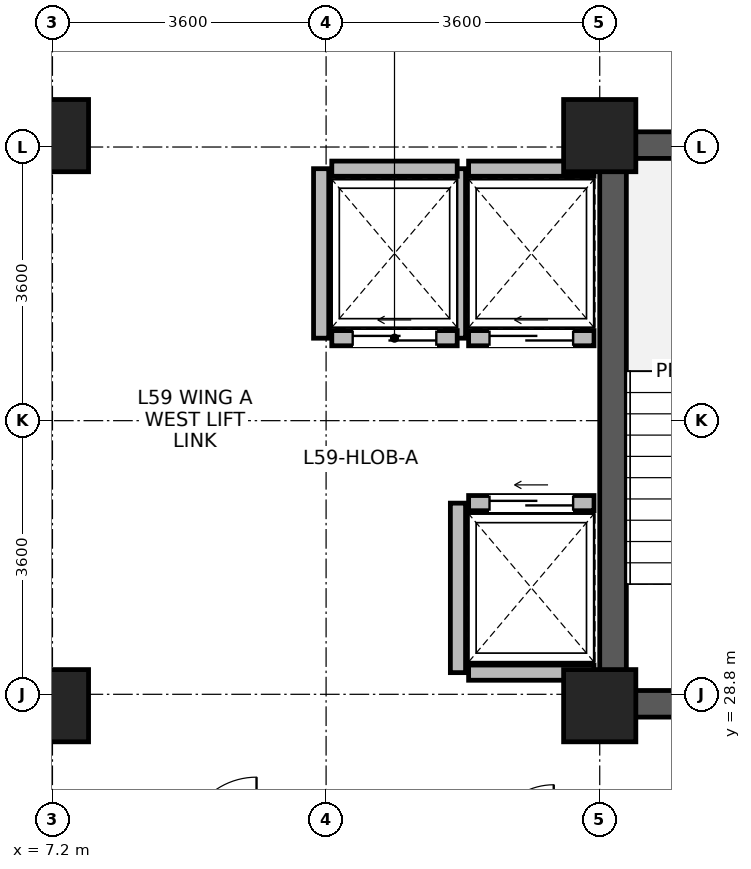
"""IFC4 building model, lengths in metres.
Left out: names, types, materials, properties, quantities, classifications, styles, units other than length and angle.
Written with IfcOpenShell. Run it as: python <this file> out.ifc"""

import sys

from ifc_helpers import new_model, si_unit, direction, frame, frame_2d, origin, origin_2d, place, context, subcontext, project, spatial, rectangle, extrude, source, transform, mapped, element, fill, save


model = new_model("IFC4")
c1 = context("Model", 3, precision=1e-05, world=origin(), true_north=direction((0.0, 1.0)))
c2 = subcontext(c1, "Body", "Model", "MODEL_VIEW")
j1 = project(units=[si_unit("LENGTHUNIT", "METRE"), si_unit("PLANEANGLEUNIT", "RADIAN")], contexts=[c1])
p1 = place(None, origin())
s1 = spatial("IfcSite", under=j1, at=p1, CompositionType="ELEMENT")
p2 = place(p1, origin())
s2 = spatial("IfcBuilding", under=s1, at=p2, CompositionType="ELEMENT")
p3 = place(p2, frame((0.0, 0.0, 231.4)))
s3 = spatial("IfcBuildingStorey", under=s2, at=p3, CompositionType="ELEMENT", Elevation=231.4)
p4 = place(p3, frame((14.575, 28.5, 0.0), z_axis=(0.0, 0.0, 1.0), x_axis=(0.0, 1.0, 0.0)))
e1 = element("IfcWall", 1, at=p4, inside=s3, PredefinedType="SHEAR", context=c2, shape_type="SweptSolid", body=[
    extrude(rectangle(XDim=7.7, YDim=0.35, at=frame_2d((3.85, 0.0))), origin(), (0.0, 0.0, 1.0), 3.44),
])
for number, where, z_axis, x_axis in (
    (2, (14.75, 28.675, 0.0), (0.0, 0.0, 1.0), (1.0, 0.0, 0.0)),
    (3, (14.75, 36.025, 0.0), (0.0, 0.0, 1.0), (1.0, 0.0, 0.0)),
):
    element("IfcWall", number, at=place(p3, frame(where, z_axis=z_axis, x_axis=x_axis)), inside=s3, PredefinedType="SHEAR", context=c2, shape_type="SweptSolid", body=[
        extrude(rectangle(XDim=3.2, YDim=0.35, at=frame_2d((1.6, 0.0))), origin(), (0.0, 0.0, 1.0), 3.44),
    ])
m1 = source(origin(), c2, "Body", "SweptSolid", [
    extrude(rectangle(XDim=0.95, YDim=0.95, at=origin_2d()), origin(), (0.0, 0.0, 1.0), 3.7),
])
for number, where, z_axis, x_axis in (
    (4, (7.2, 28.65, 0.0), (0.0, 0.0, 1.0), (1.0, 0.0, 0.0)),
    (5, (7.2, 36.15, 0.0), (0.0, 0.0, 1.0), (1.0, 0.0, 0.0)),
    (6, (14.4, 28.65, 0.0), (0.0, 0.0, 1.0), (1.0, 0.0, 0.0)),
    (7, (14.4, 36.15, 0.0), (0.0, 0.0, 1.0), (1.0, 0.0, 0.0)),
):
    element("IfcColumn", number, at=place(p3, frame(where, z_axis=z_axis, x_axis=x_axis)), inside=s3, PredefinedType="COLUMN", context=c2, shape_type="MappedRepresentation", body=[
        mapped(m1, transform((0.0, 0.0, 0.0), x_axis=(1.0, 0.0, 0.0), y_axis=(0.0, 1.0, 0.0), z_axis=(0.0, 0.0, 1.0), scale=1.0)),
    ])
p5 = place(p3, frame((12.675, 33.485, 0.0), z_axis=(0.0, 0.0, 1.0), x_axis=(1.0, 0.0, 0.0)))
e8 = element("IfcWall", 8, at=p5, inside=s3, PredefinedType="PARTITIONING", context=c2, shape_type="SweptSolid", body=[
    extrude(rectangle(XDim=1.65, YDim=0.2, at=frame_2d((0.825, 0.0))), origin(), (0.0, 0.0, 1.0), 3.42),
])
p6 = place(p5, frame((0.275, 0.0, 0.0)))
e9 = element("IfcOpeningElement", 9, at=p6, cuts=e8, PredefinedType="OPENING", context=c2, shape_type="SweptSolid", body=[
    extrude(rectangle(XDim=1.1, YDim=2.12, at=frame_2d((0.55, 1.06))), frame((0.0, 0.11, 0.0), z_axis=(0.0, -1.0, 0.0), x_axis=(1.0, 0.0, 0.0)), (0.0, 0.0, 1.0), 0.22),
])
p7 = place(p3, frame((12.675, 35.715, 0.0), z_axis=(0.0, 0.0, 1.0), x_axis=(1.0, 0.0, 0.0)))
e10 = element("IfcWall", 10, at=p7, inside=s3, PredefinedType="PARTITIONING", context=c2, shape_type="SweptSolid", body=[
    extrude(rectangle(XDim=1.65, YDim=0.2, at=frame_2d((0.825, 0.0))), origin(), (0.0, 0.0, 1.0), 3.42),
])
p8 = place(p3, frame((12.535, 33.485, 0.0), z_axis=(0.0, 0.0, 1.0), x_axis=(0.0, 1.0, 0.0)))
e11 = element("IfcWall", 11, at=p8, inside=s3, PredefinedType="PARTITIONING", context=c2, shape_type="SweptSolid", body=[
    extrude(rectangle(XDim=2.23, YDim=0.2, at=frame_2d((1.115, 0.0))), origin(), (0.0, 0.0, 1.0), 3.42),
])
p9 = place(p3, frame((12.675, 29.085, 0.0), z_axis=(0.0, 0.0, 1.0), x_axis=(1.0, 0.0, 0.0)))
e12 = element("IfcWall", 12, at=p9, inside=s3, PredefinedType="PARTITIONING", context=c2, shape_type="SweptSolid", body=[
    extrude(rectangle(XDim=1.65, YDim=0.2, at=frame_2d((0.825, 0.0))), origin(), (0.0, 0.0, 1.0), 3.42),
])
p10 = place(p3, frame((12.675, 31.315, 0.0), z_axis=(0.0, 0.0, 1.0), x_axis=(1.0, 0.0, 0.0)))
e13 = element("IfcWall", 13, at=p10, inside=s3, PredefinedType="PARTITIONING", context=c2, shape_type="SweptSolid", body=[
    extrude(rectangle(XDim=1.65, YDim=0.2, at=frame_2d((0.825, 0.0))), origin(), (0.0, 0.0, 1.0), 3.42),
])
p11 = place(p10, frame((0.275, 0.0, 0.0)))
e14 = element("IfcOpeningElement", 14, at=p11, cuts=e13, PredefinedType="OPENING", context=c2, shape_type="SweptSolid", body=[
    extrude(rectangle(XDim=1.1, YDim=2.12, at=frame_2d((0.55, 1.06))), frame((0.0, 0.11, 0.0), z_axis=(0.0, -1.0, 0.0), x_axis=(1.0, 0.0, 0.0)), (0.0, 0.0, 1.0), 0.22),
])
p12 = place(p3, frame((12.535, 29.085, 0.0), z_axis=(0.0, 0.0, 1.0), x_axis=(0.0, 1.0, 0.0)))
e15 = element("IfcWall", 15, at=p12, inside=s3, PredefinedType="PARTITIONING", context=c2, shape_type="SweptSolid", body=[
    extrude(rectangle(XDim=2.23, YDim=0.2, at=frame_2d((1.115, 0.0))), origin(), (0.0, 0.0, 1.0), 3.42),
])
p13 = place(p3, frame((10.875, 33.485, 0.0), z_axis=(0.0, 0.0, 1.0), x_axis=(1.0, 0.0, 0.0)))
e16 = element("IfcWall", 16, at=p13, inside=s3, PredefinedType="PARTITIONING", context=c2, shape_type="SweptSolid", body=[
    extrude(rectangle(XDim=1.65, YDim=0.2, at=frame_2d((0.825, 0.0))), origin(), (0.0, 0.0, 1.0), 3.42),
])
p14 = place(p13, frame((0.275, 0.0, 0.0)))
e17 = element("IfcOpeningElement", 17, at=p14, cuts=e16, PredefinedType="OPENING", context=c2, shape_type="SweptSolid", body=[
    extrude(rectangle(XDim=1.1, YDim=2.12, at=frame_2d((0.55, 1.06))), frame((0.0, 0.11, 0.0), z_axis=(0.0, -1.0, 0.0), x_axis=(1.0, 0.0, 0.0)), (0.0, 0.0, 1.0), 0.22),
])
p15 = place(p3, frame((10.875, 35.715, 0.0), z_axis=(0.0, 0.0, 1.0), x_axis=(1.0, 0.0, 0.0)))
e18 = element("IfcWall", 18, at=p15, inside=s3, PredefinedType="PARTITIONING", context=c2, shape_type="SweptSolid", body=[
    extrude(rectangle(XDim=1.65, YDim=0.2, at=frame_2d((0.825, 0.0))), origin(), (0.0, 0.0, 1.0), 3.42),
])
p16 = place(p3, frame((10.735, 33.485, 0.0), z_axis=(0.0, 0.0, 1.0), x_axis=(0.0, 1.0, 0.0)))
e19 = element("IfcWall", 19, at=p16, inside=s3, PredefinedType="PARTITIONING", context=c2, shape_type="SweptSolid", body=[
    extrude(rectangle(XDim=2.23, YDim=0.2, at=frame_2d((1.115, 0.0))), origin(), (0.0, 0.0, 1.0), 3.42),
])
p17 = place(p6, origin())
e20 = element("IfcDoor", 20, at=p17, inside=s3, OperationType="SLIDING_TO_LEFT", PredefinedType="DOOR", context=c2, shape_type="SweptSolid", body=[
    extrude(rectangle(XDim=1.1, YDim=2.12, at=frame_2d((0.55, 1.06))), frame((0.0, 0.025, 0.0), z_axis=(0.0, -1.0, 0.0), x_axis=(1.0, 0.0, 0.0)), (0.0, 0.0, 1.0), 0.05),
])
fill(e9, e20)
p18 = place(p11, origin())
e21 = element("IfcDoor", 21, at=p18, inside=s3, OperationType="SLIDING_TO_LEFT", PredefinedType="DOOR", context=c2, shape_type="SweptSolid", body=[
    extrude(rectangle(XDim=1.1, YDim=2.12, at=frame_2d((0.55, 1.06))), frame((0.0, 0.025, 0.0), z_axis=(0.0, -1.0, 0.0), x_axis=(1.0, 0.0, 0.0)), (0.0, 0.0, 1.0), 0.05),
])
fill(e14, e21)
p19 = place(p14, origin())
e22 = element("IfcDoor", 22, at=p19, inside=s3, OperationType="SLIDING_TO_LEFT", PredefinedType="DOOR", context=c2, shape_type="SweptSolid", body=[
    extrude(rectangle(XDim=1.1, YDim=2.12, at=frame_2d((0.55, 1.06))), frame((0.0, 0.025, 0.0), z_axis=(0.0, -1.0, 0.0), x_axis=(1.0, 0.0, 0.0)), (0.0, 0.0, 1.0), 0.05),
])
fill(e17, e22)
save(model, sys.argv[1])
